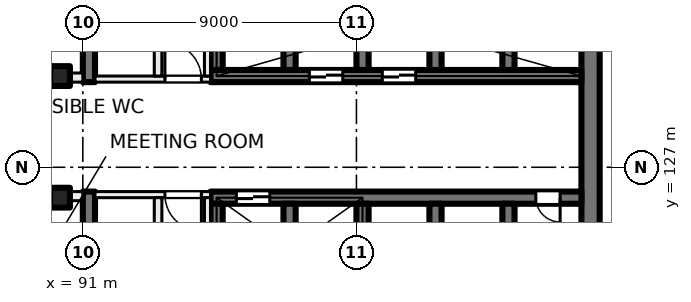
"""IFC4 building model, lengths in metres.
Left out: names, types, materials, properties, quantities, classifications, styles, units other than length and angle.
Written with IfcOpenShell. Run it as: python <this file> out.ifc"""

import sys

from ifc_helpers import new_model, si_unit, direction, frame, frame_2d, origin, origin_2d, place, context, subcontext, project, spatial, rectangle, extrude, element, fill, save


model = new_model("IFC4")
c1 = context("Model", 3, precision=1e-05, world=origin(), true_north=direction((0.0, 1.0)))
c2 = subcontext(c1, "Body", "Model", "MODEL_VIEW")
j1 = project(units=[si_unit("LENGTHUNIT", "METRE"), si_unit("PLANEANGLEUNIT", "RADIAN")], contexts=[c1])
p1 = place(None, origin())
s1 = spatial("IfcSite", under=j1, at=p1, CompositionType="ELEMENT")
p2 = place(p1, origin())
s2 = spatial("IfcBuilding", under=s1, at=p2, CompositionType="ELEMENT")
p3 = place(p2, frame((0.0, 0.0, 89.0)))
s3 = spatial("IfcBuildingStorey", under=s2, at=p3, CompositionType="ELEMENT", Elevation=89.0)
for number, where, z_axis, x_axis in (
    (1, (90.25, 130.0, 0.0), (0.0, 0.0, 1.0), (1.0, 0.0, 0.0)),
    (2, (90.25, 126.0, 0.0), (0.0, 0.0, 1.0), (1.0, 0.0, 0.0)),
):
    element("IfcColumn", number, at=place(p3, frame(where, z_axis=z_axis, x_axis=x_axis)), inside=s3, PredefinedType="COLUMN", context=c2, shape_type="SweptSolid", body=[
        extrude(rectangle(XDim=0.65, YDim=0.65, at=origin_2d()), origin(), (0.0, 0.0, 1.0), 4.0),
    ])
p4 = place(p3, frame((107.7, 135.2, 0.0), z_axis=(0.0, 0.0, 1.0), x_axis=(0.0, -1.0, 0.0)))
e3 = element("IfcWall", 3, at=p4, inside=s3, PredefinedType="SHEAR", context=c2, shape_type="SweptSolid", body=[
    extrude(rectangle(XDim=14.4, YDim=0.6, at=frame_2d((7.2, 0.0))), origin(), (0.0, 0.0, 1.0), 4.0),
])
p5 = place(p3, frame((107.4, 130.0, 0.0), z_axis=(0.0, 0.0, 1.0), x_axis=(-1.0, 0.0, 0.0)))
e4 = element("IfcWall", 4, at=p5, inside=s3, PredefinedType="SHEAR", context=c2, shape_type="SweptSolid", body=[
    extrude(rectangle(XDim=12.2, YDim=0.4, at=frame_2d((6.1, 0.0))), origin(), (0.0, 0.0, 1.0), 4.0),
])
p6 = place(p5, frame((5.45, 0.0, 0.0)))
e5 = element("IfcOpeningElement", 5, at=p6, cuts=e4, PredefinedType="OPENING", context=c2, shape_type="SweptSolid", body=[
    extrude(rectangle(XDim=1.1, YDim=2.1, at=frame_2d((0.55, 1.05))), frame((0.0, 0.21, 0.0), z_axis=(0.0, -1.0, 0.0), x_axis=(1.0, 0.0, 0.0)), (0.0, 0.0, 1.0), 0.42),
])
p7 = place(p5, frame((7.85, 0.0, 0.0)))
e6 = element("IfcOpeningElement", 6, at=p7, cuts=e4, PredefinedType="OPENING", context=c2, shape_type="SweptSolid", body=[
    extrude(rectangle(XDim=1.1, YDim=2.1, at=frame_2d((0.55, 1.05))), frame((0.0, 0.21, 0.0), z_axis=(0.0, -1.0, 0.0), x_axis=(1.0, 0.0, 0.0)), (0.0, 0.0, 1.0), 0.42),
])
for number, where, z_axis, x_axis in (
    (7, (105.0, 133.2, 0.0), (0.0, 0.0, 1.0), (0.0, -1.0, 0.0)),
    (8, (102.6, 133.2, 0.0), (0.0, 0.0, 1.0), (0.0, -1.0, 0.0)),
    (9, (100.2, 133.2, 0.0), (0.0, 0.0, 1.0), (0.0, -1.0, 0.0)),
    (10, (97.8, 133.2, 0.0), (0.0, 0.0, 1.0), (0.0, -1.0, 0.0)),
    (11, (95.4, 133.2, 0.0), (0.0, 0.0, 1.0), (0.0, -1.0, 0.0)),
):
    element("IfcWall", number, at=place(p3, frame(where, z_axis=z_axis, x_axis=x_axis)), inside=s3, PredefinedType="SHEAR", context=c2, shape_type="SweptSolid", body=[
        extrude(rectangle(XDim=3.0, YDim=0.4, at=frame_2d((1.5, 0.0))), origin(), (0.0, 0.0, 1.0), 4.0),
    ])
p8 = place(p3, frame((107.4, 126.0, 0.0), z_axis=(0.0, 0.0, 1.0), x_axis=(-1.0, 0.0, 0.0)))
e12 = element("IfcWall", 12, at=p8, inside=s3, PredefinedType="SHEAR", context=c2, shape_type="SweptSolid", body=[
    extrude(rectangle(XDim=12.2, YDim=0.4, at=frame_2d((6.1, 0.0))), origin(), (0.0, 0.0, 1.0), 4.0),
])
p9 = place(p8, frame((10.25, 0.0, 0.0)))
e13 = element("IfcOpeningElement", 13, at=p9, cuts=e12, PredefinedType="OPENING", context=c2, shape_type="SweptSolid", body=[
    extrude(rectangle(XDim=1.1, YDim=2.1, at=frame_2d((0.55, 1.05))), frame((0.0, 0.21, 0.0), z_axis=(0.0, -1.0, 0.0), x_axis=(1.0, 0.0, 0.0)), (0.0, 0.0, 1.0), 0.42),
])
p10 = place(p8, frame((0.7, 0.0, 0.0)))
e14 = element("IfcOpeningElement", 14, at=p10, cuts=e12, PredefinedType="OPENING", context=c2, shape_type="SweptSolid", body=[
    extrude(rectangle(XDim=0.8, YDim=2.1, at=frame_2d((0.4, 1.05))), frame((0.0, 0.21, 0.0), z_axis=(0.0, -1.0, 0.0), x_axis=(1.0, 0.0, 0.0)), (0.0, 0.0, 1.0), 0.42),
])
for number, where, z_axis, x_axis in (
    (15, (105.0, 125.8, 0.0), (0.0, 0.0, 1.0), (0.0, -1.0, 0.0)),
    (16, (102.6, 125.8, 0.0), (0.0, 0.0, 1.0), (0.0, -1.0, 0.0)),
    (17, (100.2, 125.8, 0.0), (0.0, 0.0, 1.0), (0.0, -1.0, 0.0)),
    (18, (97.8, 125.8, 0.0), (0.0, 0.0, 1.0), (0.0, -1.0, 0.0)),
    (19, (95.4, 125.8, 0.0), (0.0, 0.0, 1.0), (0.0, -1.0, 0.0)),
):
    element("IfcWall", number, at=place(p3, frame(where, z_axis=z_axis, x_axis=x_axis)), inside=s3, PredefinedType="SHEAR", context=c2, shape_type="SweptSolid", body=[
        extrude(rectangle(XDim=3.0, YDim=0.4, at=frame_2d((1.5, 0.0))), origin(), (0.0, 0.0, 1.0), 4.0),
    ])
for number, where, z_axis, x_axis in (
    (20, (91.2, 138.4, 0.0), (0.0, 0.0, 1.0), (0.0, -1.0, 0.0)),
    (21, (91.2, 126.2, 0.0), (0.0, 0.0, 1.0), (0.0, -1.0, 0.0)),
):
    element("IfcWall", number, at=place(p3, frame(where, z_axis=z_axis, x_axis=x_axis)), inside=s3, PredefinedType="SHEAR", context=c2, shape_type="SweptSolid", body=[
        extrude(rectangle(XDim=8.6, YDim=0.4, at=frame_2d((4.3, 0.0))), origin(), (0.0, 0.0, 1.0), 4.0),
    ])
p11 = place(p3, frame((95.2, 126.1, 0.0), z_axis=(0.0, 0.0, 1.0), x_axis=(-1.0, 0.0, 0.0)))
e22 = element("IfcWall", 22, at=p11, inside=s3, PredefinedType="PARTITIONING", context=c2, shape_type="SweptSolid", body=[
    extrude(rectangle(XDim=3.8, YDim=0.2, at=frame_2d((1.9, 0.0))), origin(), (0.0, 0.0, 1.0), 3.625),
])
p12 = place(p11, frame((0.3, 0.0, 0.0)))
e23 = element("IfcOpeningElement", 23, at=p12, cuts=e22, PredefinedType="OPENING", context=c2, shape_type="SweptSolid", body=[
    extrude(rectangle(XDim=1.2, YDim=2.1, at=frame_2d((0.6, 1.05))), frame((0.0, 0.11, 0.0), z_axis=(0.0, -1.0, 0.0), x_axis=(1.0, 0.0, 0.0)), (0.0, 0.0, 1.0), 0.22),
])
p13 = place(p3, frame((95.1, 117.6, 0.0), z_axis=(0.0, 0.0, 1.0), x_axis=(0.0, 1.0, 0.0)))
e24 = element("IfcWall", 24, at=p13, inside=s3, PredefinedType="PARTITIONING", context=c2, shape_type="SweptSolid", body=[
    extrude(rectangle(XDim=8.4, YDim=0.2, at=frame_2d((4.2, 0.0))), origin(), (0.0, 0.0, 1.0), 3.625),
])
p14 = place(p13, frame((1.65, 0.0, 0.0)))
e25 = element("IfcOpeningElement", 25, at=p14, cuts=e24, PredefinedType="OPENING", context=c2, shape_type="SweptSolid", body=[
    extrude(rectangle(XDim=1.5, YDim=2.1, at=frame_2d((0.75, 1.05))), frame((0.0, 0.11, 0.0), z_axis=(0.0, -1.0, 0.0), x_axis=(1.0, 0.0, 0.0)), (0.0, 0.0, 1.0), 0.22),
])
p15 = place(p3, frame((93.475, 117.6, 0.0), z_axis=(0.0, 0.0, 1.0), x_axis=(0.0, 1.0, 0.0)))
e26 = element("IfcWall", 26, at=p15, inside=s3, PredefinedType="PARTITIONING", context=c2, shape_type="SweptSolid", body=[
    extrude(rectangle(XDim=8.4, YDim=0.25, at=frame_2d((4.2, 0.0))), origin(), (0.0, 0.0, 1.0), 3.625),
])
p16 = place(p15, frame((5.225, 0.0, 0.0)))
e27 = element("IfcOpeningElement", 27, at=p16, cuts=e26, PredefinedType="OPENING", context=c2, shape_type="SweptSolid", body=[
    extrude(rectangle(XDim=0.8, YDim=2.1, at=frame_2d((0.4, 1.05))), frame((0.0, 0.135, 0.0), z_axis=(0.0, -1.0, 0.0), x_axis=(1.0, 0.0, 0.0)), (0.0, 0.0, 1.0), 0.27),
])
p17 = place(p15, frame((0.975, 0.0, 0.0)))
e28 = element("IfcOpeningElement", 28, at=p17, cuts=e26, PredefinedType="OPENING", context=c2, shape_type="SweptSolid", body=[
    extrude(rectangle(XDim=0.8, YDim=2.1, at=frame_2d((0.4, 1.05))), frame((0.0, 0.135, 0.0), z_axis=(0.0, -1.0, 0.0), x_axis=(1.0, 0.0, 0.0)), (0.0, 0.0, 1.0), 0.27),
])
p18 = place(p3, frame((91.4, 129.9, 0.0), z_axis=(0.0, 0.0, 1.0), x_axis=(1.0, 0.0, 0.0)))
e29 = element("IfcWall", 29, at=p18, inside=s3, PredefinedType="PARTITIONING", context=c2, shape_type="SweptSolid", body=[
    extrude(rectangle(XDim=3.8, YDim=0.2, at=frame_2d((1.9, 0.0))), origin(), (0.0, 0.0, 1.0), 3.625),
])
p19 = place(p18, frame((2.3, 0.0, 0.0)))
e30 = element("IfcOpeningElement", 30, at=p19, cuts=e29, PredefinedType="OPENING", context=c2, shape_type="SweptSolid", body=[
    extrude(rectangle(XDim=1.2, YDim=2.1, at=frame_2d((0.6, 1.05))), frame((0.0, 0.11, 0.0), z_axis=(0.0, -1.0, 0.0), x_axis=(1.0, 0.0, 0.0)), (0.0, 0.0, 1.0), 0.22),
])
p20 = place(p3, frame((95.1, 130.0, 0.0), z_axis=(0.0, 0.0, 1.0), x_axis=(0.0, 1.0, 0.0)))
e31 = element("IfcWall", 31, at=p20, inside=s3, PredefinedType="PARTITIONING", context=c2, shape_type="SweptSolid", body=[
    extrude(rectangle(XDim=8.4, YDim=0.2, at=frame_2d((4.2, 0.0))), origin(), (0.0, 0.0, 1.0), 3.625),
])
p21 = place(p20, frame((5.25, 0.0, 0.0)))
e32 = element("IfcOpeningElement", 32, at=p21, cuts=e31, PredefinedType="OPENING", context=c2, shape_type="SweptSolid", body=[
    extrude(rectangle(XDim=1.5, YDim=2.1, at=frame_2d((0.75, 1.05))), frame((0.0, 0.11, 0.0), z_axis=(0.0, -1.0, 0.0), x_axis=(1.0, 0.0, 0.0)), (0.0, 0.0, 1.0), 0.22),
])
p22 = place(p3, frame((93.475, 130.0, 0.0), z_axis=(0.0, 0.0, 1.0), x_axis=(0.0, 1.0, 0.0)))
e33 = element("IfcWall", 33, at=p22, inside=s3, PredefinedType="PARTITIONING", context=c2, shape_type="SweptSolid", body=[
    extrude(rectangle(XDim=8.4, YDim=0.25, at=frame_2d((4.2, 0.0))), origin(), (0.0, 0.0, 1.0), 3.625),
])
p23 = place(p22, frame((1.575, 0.0, 0.0)))
e34 = element("IfcOpeningElement", 34, at=p23, cuts=e33, PredefinedType="OPENING", context=c2, shape_type="SweptSolid", body=[
    extrude(rectangle(XDim=1.0, YDim=2.1, at=frame_2d((0.5, 1.05))), frame((0.0, 0.135, 0.0), z_axis=(0.0, -1.0, 0.0), x_axis=(1.0, 0.0, 0.0)), (0.0, 0.0, 1.0), 0.27),
])
p24 = place(p22, frame((5.825, 0.0, 0.0)))
e35 = element("IfcOpeningElement", 35, at=p24, cuts=e33, PredefinedType="OPENING", context=c2, shape_type="SweptSolid", body=[
    extrude(rectangle(XDim=1.0, YDim=2.1, at=frame_2d((0.5, 1.05))), frame((0.0, 0.135, 0.0), z_axis=(0.0, -1.0, 0.0), x_axis=(1.0, 0.0, 0.0)), (0.0, 0.0, 1.0), 0.27),
])
p25 = place(p3, frame((72.5, 129.95, 0.0), z_axis=(0.0, 0.0, 1.0), x_axis=(1.0, 0.0, 0.0)))
e36 = element("IfcWall", 36, at=p25, inside=s3, PredefinedType="PARTITIONING", context=c2, shape_type="SweptSolid", body=[
    extrude(rectangle(XDim=18.5, YDim=0.3, at=frame_2d((9.25, 0.0))), origin(), (0.0, 0.0, 1.0), 3.625),
])
p26 = place(p25, frame((11.5, 0.0, 0.0)))
e37 = element("IfcOpeningElement", 37, at=p26, cuts=e36, PredefinedType="OPENING", context=c2, shape_type="SweptSolid", body=[
    extrude(rectangle(XDim=1.0, YDim=2.1, at=frame_2d((0.5, 1.05))), frame((0.0, 0.16, 0.0), z_axis=(0.0, -1.0, 0.0), x_axis=(1.0, 0.0, 0.0)), (0.0, 0.0, 1.0), 0.32),
])
p27 = place(p25, frame((3.875, 0.0, 0.0)))
e38 = element("IfcOpeningElement", 38, at=p27, cuts=e36, PredefinedType="OPENING", context=c2, shape_type="SweptSolid", body=[
    extrude(rectangle(XDim=1.0, YDim=2.1, at=frame_2d((0.5, 1.05))), frame((0.0, 0.16, 0.0), z_axis=(0.0, -1.0, 0.0), x_axis=(1.0, 0.0, 0.0)), (0.0, 0.0, 1.0), 0.32),
])
p28 = place(p3, frame((91.0, 126.05, 0.0), z_axis=(0.0, 0.0, 1.0), x_axis=(-1.0, 0.0, 0.0)))
e39 = element("IfcWall", 39, at=p28, inside=s3, PredefinedType="PARTITIONING", context=c2, shape_type="SweptSolid", body=[
    extrude(rectangle(XDim=43.785, YDim=0.3, at=frame_2d((21.893, 0.0))), origin(), (0.0, 0.0, 1.0), 3.625),
])
p29 = place(p28, frame((2.025, 0.0, 0.0)))
e40 = element("IfcOpeningElement", 40, at=p29, cuts=e39, PredefinedType="OPENING", context=c2, shape_type="SweptSolid", body=[
    extrude(rectangle(XDim=1.2, YDim=2.1, at=frame_2d((0.6, 1.05))), frame((0.0, 0.16, 0.0), z_axis=(0.0, -1.0, 0.0), x_axis=(1.0, 0.0, 0.0)), (0.0, 0.0, 1.0), 0.32),
])
p30 = place(p28, frame((6.9, 0.0, 0.0)))
e41 = element("IfcOpeningElement", 41, at=p30, cuts=e39, PredefinedType="OPENING", context=c2, shape_type="SweptSolid", body=[
    extrude(rectangle(XDim=1.2, YDim=2.1, at=frame_2d((0.6, 1.05))), frame((0.0, 0.16, 0.0), z_axis=(0.0, -1.0, 0.0), x_axis=(1.0, 0.0, 0.0)), (0.0, 0.0, 1.0), 0.32),
])
p31 = place(p28, frame((11.4, 0.0, 0.0)))
e42 = element("IfcOpeningElement", 42, at=p31, cuts=e39, PredefinedType="OPENING", context=c2, shape_type="SweptSolid", body=[
    extrude(rectangle(XDim=1.2, YDim=2.1, at=frame_2d((0.6, 1.05))), frame((0.0, 0.16, 0.0), z_axis=(0.0, -1.0, 0.0), x_axis=(1.0, 0.0, 0.0)), (0.0, 0.0, 1.0), 0.32),
])
p32 = place(p28, frame((15.25, 0.0, 0.0)))
e43 = element("IfcOpeningElement", 43, at=p32, cuts=e39, PredefinedType="OPENING", context=c2, shape_type="SweptSolid", body=[
    extrude(rectangle(XDim=1.0, YDim=2.1, at=frame_2d((0.5, 1.05))), frame((0.0, 0.16, 0.0), z_axis=(0.0, -1.0, 0.0), x_axis=(1.0, 0.0, 0.0)), (0.0, 0.0, 1.0), 0.32),
])
p33 = place(p28, frame((19.9, 0.0, 0.0)))
e44 = element("IfcOpeningElement", 44, at=p33, cuts=e39, PredefinedType="OPENING", context=c2, shape_type="SweptSolid", body=[
    extrude(rectangle(XDim=1.2, YDim=2.1, at=frame_2d((0.6, 1.05))), frame((0.0, 0.16, 0.0), z_axis=(0.0, -1.0, 0.0), x_axis=(1.0, 0.0, 0.0)), (0.0, 0.0, 1.0), 0.32),
])
p34 = place(p28, frame((23.85, 0.0, 0.0)))
e45 = element("IfcOpeningElement", 45, at=p34, cuts=e39, PredefinedType="OPENING", context=c2, shape_type="SweptSolid", body=[
    extrude(rectangle(XDim=1.8, YDim=2.1, at=frame_2d((0.9, 1.05))), frame((0.0, 0.16, 0.0), z_axis=(0.0, -1.0, 0.0), x_axis=(1.0, 0.0, 0.0)), (0.0, 0.0, 1.0), 0.32),
])
p35 = place(p28, frame((34.0, 0.0, 0.0)))
e46 = element("IfcOpeningElement", 46, at=p35, cuts=e39, PredefinedType="OPENING", context=c2, shape_type="SweptSolid", body=[
    extrude(rectangle(XDim=1.0, YDim=2.1, at=frame_2d((0.5, 1.05))), frame((0.0, 0.16, 0.0), z_axis=(0.0, -1.0, 0.0), x_axis=(1.0, 0.0, 0.0)), (0.0, 0.0, 1.0), 0.32),
])
p36 = place(p28, frame((39.296, 0.0, 0.0)))
e47 = element("IfcOpeningElement", 47, at=p36, cuts=e39, PredefinedType="OPENING", context=c2, shape_type="SweptSolid", body=[
    extrude(rectangle(XDim=1.8, YDim=2.1, at=frame_2d((0.9, 1.05))), frame((0.0, 0.16, 0.0), z_axis=(0.0, -1.0, 0.0), x_axis=(1.0, 0.0, 0.0)), (0.0, 0.0, 1.0), 0.32),
])
p37 = place(p9, origin())
e48 = element("IfcDoor", 48, at=p37, inside=s3, OperationType="DOUBLE_DOOR_SLIDING", PredefinedType="DOOR", context=c2, shape_type="SweptSolid", body=[
    extrude(rectangle(XDim=1.1, YDim=2.1, at=frame_2d((0.55, 1.05))), frame((0.0, 0.025, 0.0), z_axis=(0.0, -1.0, 0.0), x_axis=(1.0, 0.0, 0.0)), (0.0, 0.0, 1.0), 0.05),
])
fill(e13, e48)
p38 = place(p6, origin())
e49 = element("IfcDoor", 49, at=p38, inside=s3, OperationType="DOUBLE_DOOR_SLIDING", PredefinedType="DOOR", context=c2, shape_type="SweptSolid", body=[
    extrude(rectangle(XDim=1.1, YDim=2.1, at=frame_2d((0.55, 1.05))), frame((0.0, 0.025, 0.0), z_axis=(0.0, -1.0, 0.0), x_axis=(1.0, 0.0, 0.0)), (0.0, 0.0, 1.0), 0.05),
])
fill(e5, e49)
p39 = place(p7, origin())
e50 = element("IfcDoor", 50, at=p39, inside=s3, OperationType="DOUBLE_DOOR_SLIDING", PredefinedType="DOOR", context=c2, shape_type="SweptSolid", body=[
    extrude(rectangle(XDim=1.1, YDim=2.1, at=frame_2d((0.55, 1.05))), frame((0.0, 0.025, 0.0), z_axis=(0.0, -1.0, 0.0), x_axis=(1.0, 0.0, 0.0)), (0.0, 0.0, 1.0), 0.05),
])
fill(e6, e50)
p40 = place(p10, origin())
e51 = element("IfcDoor", 51, at=p40, inside=s3, OperationType="SINGLE_SWING_LEFT", PredefinedType="DOOR", context=c2, shape_type="SweptSolid", body=[
    extrude(rectangle(XDim=0.8, YDim=2.1, at=frame_2d((0.4, 1.05))), frame((0.0, 0.025, 0.0), z_axis=(0.0, -1.0, 0.0), x_axis=(1.0, 0.0, 0.0)), (0.0, 0.0, 1.0), 0.05),
])
fill(e14, e51)
p41 = place(p12, origin())
e52 = element("IfcDoor", 52, at=p41, inside=s3, OperationType="DOUBLE_DOOR_SINGLE_SWING", PredefinedType="DOOR", context=c2, shape_type="SweptSolid", body=[
    extrude(rectangle(XDim=1.2, YDim=2.1, at=frame_2d((0.6, 1.05))), frame((0.0, 0.025, 0.0), z_axis=(0.0, -1.0, 0.0), x_axis=(1.0, 0.0, 0.0)), (0.0, 0.0, 1.0), 0.05),
])
fill(e23, e52)
p42 = place(p19, origin())
e53 = element("IfcDoor", 53, at=p42, inside=s3, OperationType="DOUBLE_DOOR_SINGLE_SWING", PredefinedType="DOOR", context=c2, shape_type="SweptSolid", body=[
    extrude(rectangle(XDim=1.2, YDim=2.1, at=frame_2d((0.6, 1.05))), frame((0.0, 0.025, 0.0), z_axis=(0.0, -1.0, 0.0), x_axis=(1.0, 0.0, 0.0)), (0.0, 0.0, 1.0), 0.05),
])
fill(e30, e53)
save(model, sys.argv[1])
